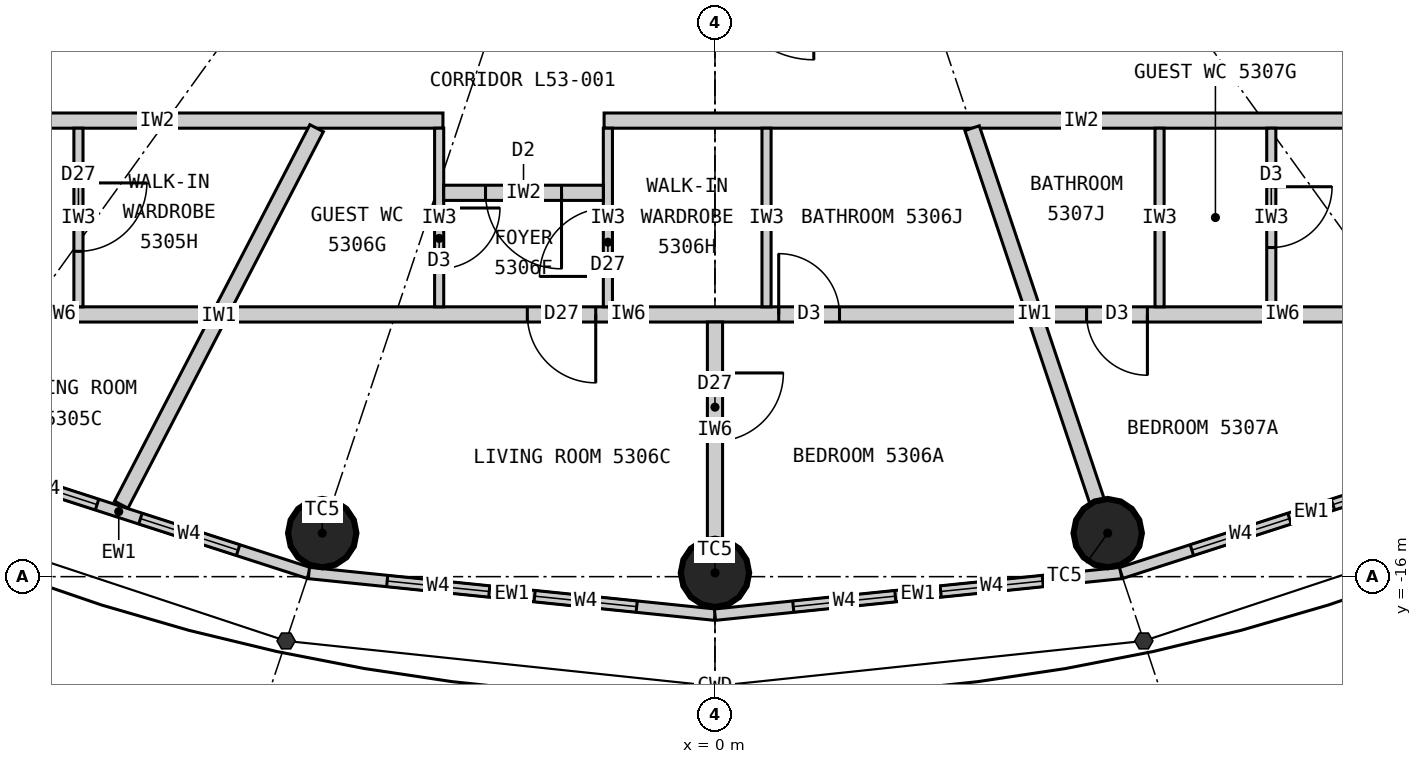
"""IFC4 building model, lengths in metres.
Left out: names, types, materials, properties, quantities, classifications, styles, units other than length and angle.
Written with IfcOpenShell. Run it as: python <this file> out.ifc"""

import sys

from ifc_helpers import new_model, si_unit, direction, frame, frame_2d, origin, origin_2d, place, context, subcontext, project, spatial, rectangle, circle, extrude, element, fill, save


model = new_model("IFC4")
c1 = context("Model", 3, precision=1e-05, world=origin(), true_north=direction((0.0, 1.0)))
c2 = subcontext(c1, "Body", "Model", "MODEL_VIEW")
j1 = project(units=[si_unit("LENGTHUNIT", "METRE"), si_unit("PLANEANGLEUNIT", "RADIAN")], contexts=[c1])
p1 = place(None, origin())
s1 = spatial("IfcSite", under=j1, at=p1, CompositionType="ELEMENT")
p2 = place(p1, origin())
s2 = spatial("IfcBuilding", under=s1, at=p2, CompositionType="ELEMENT")
p3 = place(p2, frame((0.0, 0.0, 199.5)))
s3 = spatial("IfcBuildingStorey", under=s2, at=p3, CompositionType="ELEMENT", Elevation=199.5)
for number, where, z_axis, x_axis in (
    (1, (-5.167, -15.427, 0.0), (0.0, 0.0, 1.0), (1.0, 0.0, 0.0)),
    (2, (0.0, -15.95, 0.0), (0.0, 0.0, 1.0), (1.0, 0.0, 0.0)),
    (3, (5.167, -15.427, 0.0), (0.0, 0.0, 1.0), (1.0, 0.0, 0.0)),
):
    element("IfcColumn", number, at=place(p3, frame(where, z_axis=z_axis, x_axis=x_axis)), inside=s3, PredefinedType="COLUMN", context=c2, shape_type="SweptSolid", body=[
        extrude(circle(Radius=0.45, at=origin_2d()), origin(), (0.0, 0.0, 1.0), 3.3),
    ])
p4 = place(p3, frame((-10.346, -14.336, 0.0), z_axis=(0.0, 0.0, 1.0), x_axis=(0.951644702515, -0.307200846638, 0.0)))
e4 = element("IfcWall", 4, at=p4, inside=s3, PredefinedType="ELEMENTEDWALL", context=c2, shape_type="SweptSolid", body=[
    extrude(rectangle(XDim=5.258, YDim=0.15, at=frame_2d((2.629, 0.0))), origin(), (0.0, 0.0, 1.0), 3.12),
])
p5 = place(p4, frame((0.979, 0.0, 0.9)))
e5 = element("IfcOpeningElement", 5, at=p5, cuts=e4, PredefinedType="OPENING", context=c2, shape_type="SweptSolid", body=[
    extrude(rectangle(XDim=1.35, YDim=1.9, at=frame_2d((0.675, 0.95))), frame((0.0, 0.085, 0.0), z_axis=(0.0, -1.0, 0.0), x_axis=(1.0, 0.0, 0.0)), (0.0, 0.0, 1.0), 0.17),
])
p6 = place(p4, frame((2.929, 0.0, 0.9)))
e6 = element("IfcOpeningElement", 6, at=p6, cuts=e4, PredefinedType="OPENING", context=c2, shape_type="SweptSolid", body=[
    extrude(rectangle(XDim=1.35, YDim=1.9, at=frame_2d((0.675, 0.95))), frame((0.0, 0.085, 0.0), z_axis=(0.0, -1.0, 0.0), x_axis=(1.0, 0.0, 0.0)), (0.0, 0.0, 1.0), 0.17),
])
p7 = place(p3, frame((-5.343, -15.952, 0.0), z_axis=(0.0, 0.0, 1.0), x_axis=(0.994774574972, -0.102095763818, 0.0)))
e7 = element("IfcWall", 7, at=p7, inside=s3, PredefinedType="ELEMENTEDWALL", context=c2, shape_type="SweptSolid", body=[
    extrude(rectangle(XDim=5.371, YDim=0.15, at=frame_2d((2.686, 0.0))), origin(), (0.0, 0.0, 1.0), 3.12),
])
p8 = place(p7, frame((1.035, 0.0, 0.9)))
e8 = element("IfcOpeningElement", 8, at=p8, cuts=e7, PredefinedType="OPENING", context=c2, shape_type="SweptSolid", body=[
    extrude(rectangle(XDim=1.35, YDim=1.9, at=frame_2d((0.675, 0.95))), frame((0.0, 0.085, 0.0), z_axis=(0.0, -1.0, 0.0), x_axis=(1.0, 0.0, 0.0)), (0.0, 0.0, 1.0), 0.17),
])
p9 = place(p7, frame((2.985, 0.0, 0.9)))
e9 = element("IfcOpeningElement", 9, at=p9, cuts=e7, PredefinedType="OPENING", context=c2, shape_type="SweptSolid", body=[
    extrude(rectangle(XDim=1.35, YDim=1.9, at=frame_2d((0.675, 0.95))), frame((0.0, 0.085, 0.0), z_axis=(0.0, -1.0, 0.0), x_axis=(1.0, 0.0, 0.0)), (0.0, 0.0, 1.0), 0.17),
])
p10 = place(p3, frame((0.0, -16.5, 0.0), z_axis=(0.0, 0.0, 1.0), x_axis=(0.994774574972, 0.102095763818, 0.0)))
e10 = element("IfcWall", 10, at=p10, inside=s3, PredefinedType="ELEMENTEDWALL", context=c2, shape_type="SweptSolid", body=[
    extrude(rectangle(XDim=5.371, YDim=0.15, at=frame_2d((2.686, 0.0))), origin(), (0.0, 0.0, 1.0), 3.12),
])
p11 = place(p10, frame((1.035, 0.0, 0.9)))
e11 = element("IfcOpeningElement", 11, at=p11, cuts=e10, PredefinedType="OPENING", context=c2, shape_type="SweptSolid", body=[
    extrude(rectangle(XDim=1.35, YDim=1.9, at=frame_2d((0.675, 0.95))), frame((0.0, 0.085, 0.0), z_axis=(0.0, -1.0, 0.0), x_axis=(1.0, 0.0, 0.0)), (0.0, 0.0, 1.0), 0.17),
])
p12 = place(p10, frame((2.985, 0.0, 0.9)))
e12 = element("IfcOpeningElement", 12, at=p12, cuts=e10, PredefinedType="OPENING", context=c2, shape_type="SweptSolid", body=[
    extrude(rectangle(XDim=1.35, YDim=1.9, at=frame_2d((0.675, 0.95))), frame((0.0, 0.085, 0.0), z_axis=(0.0, -1.0, 0.0), x_axis=(1.0, 0.0, 0.0)), (0.0, 0.0, 1.0), 0.17),
])
p13 = place(p3, frame((5.343, -15.952, 0.0), z_axis=(0.0, 0.0, 1.0), x_axis=(0.951644702515, 0.307200846638, 0.0)))
e13 = element("IfcWall", 13, at=p13, inside=s3, PredefinedType="ELEMENTEDWALL", context=c2, shape_type="SweptSolid", body=[
    extrude(rectangle(XDim=5.258, YDim=0.15, at=frame_2d((2.629, 0.0))), origin(), (0.0, 0.0, 1.0), 3.12),
])
p14 = place(p13, frame((0.979, 0.0, 0.9)))
e14 = element("IfcOpeningElement", 14, at=p14, cuts=e13, PredefinedType="OPENING", context=c2, shape_type="SweptSolid", body=[
    extrude(rectangle(XDim=1.35, YDim=1.9, at=frame_2d((0.675, 0.95))), frame((0.0, 0.085, 0.0), z_axis=(0.0, -1.0, 0.0), x_axis=(1.0, 0.0, 0.0)), (0.0, 0.0, 1.0), 0.17),
])
p15 = place(p13, frame((2.929, 0.0, 0.9)))
e15 = element("IfcOpeningElement", 15, at=p15, cuts=e13, PredefinedType="OPENING", context=c2, shape_type="SweptSolid", body=[
    extrude(rectangle(XDim=1.35, YDim=1.9, at=frame_2d((0.675, 0.95))), frame((0.0, 0.085, 0.0), z_axis=(0.0, -1.0, 0.0), x_axis=(1.0, 0.0, 0.0)), (0.0, 0.0, 1.0), 0.17),
])
p16 = place(p3, frame((11.1, -10.0, 0.0), z_axis=(0.0, 0.0, 1.0), x_axis=(-1.0, 0.0, 0.0)))
e16 = element("IfcWall", 16, at=p16, inside=s3, PredefinedType="PARTITIONING", context=c2, shape_type="SweptSolid", body=[
    extrude(rectangle(XDim=12.559, YDim=0.2, at=frame_2d((6.28, 0.0))), origin(), (0.0, 0.0, 1.0), 3.12),
])
p17 = place(p3, frame((-3.579, -10.0, 0.0), z_axis=(0.0, 0.0, 1.0), x_axis=(-1.0, 0.0, 0.0)))
e17 = element("IfcWall", 17, at=p17, inside=s3, PredefinedType="PARTITIONING", context=c2, shape_type="SweptSolid", body=[
    extrude(rectangle(XDim=7.521, YDim=0.2, at=frame_2d((3.761, 0.0))), origin(), (0.0, 0.0, 1.0), 3.12),
])
p18 = place(p17, frame((6.206, 0.0, 0.0)))
e18 = element("IfcOpeningElement", 18, at=p18, cuts=e17, PredefinedType="OPENING", context=c2, shape_type="SweptSolid", body=[
    extrude(rectangle(XDim=1.0, YDim=2.2, at=frame_2d((0.5, 1.1))), frame((0.0, 0.11, 0.0), z_axis=(0.0, -1.0, 0.0), x_axis=(1.0, 0.0, 0.0)), (0.0, 0.0, 1.0), 0.22),
])
p19 = place(p3, frame((-5.241, -10.1, 0.0), z_axis=(0.0, 0.0, 1.0), x_axis=(-0.460603196597, -0.887606160008, 0.0)))
e19 = element("IfcWall", 19, at=p19, inside=s3, PredefinedType="PARTITIONING", context=c2, shape_type="SweptSolid", body=[
    extrude(rectangle(XDim=5.58, YDim=0.2, at=frame_2d((2.79, 0.0))), origin(), (0.0, 0.0, 1.0), 3.12),
])
p20 = place(p3, frame((3.383, -10.1, 0.0), z_axis=(0.0, 0.0, 1.0), x_axis=(0.317602151035, -0.948224063003, 0.0)))
e20 = element("IfcWall", 20, at=p20, inside=s3, PredefinedType="PARTITIONING", context=c2, shape_type="SweptSolid", body=[
    extrude(rectangle(XDim=5.168, YDim=0.2, at=frame_2d((2.584, 0.0))), origin(), (0.0, 0.0, 1.0), 2.42),
])
p21 = place(p3, frame((-10.609, -12.55, 0.0), z_axis=(0.0, 0.0, 1.0), x_axis=(1.0, 0.0, 0.0)))
e21 = element("IfcWall", 21, at=p21, inside=s3, PredefinedType="PARTITIONING", context=c2, shape_type="SweptSolid", body=[
    extrude(rectangle(XDim=3.947, YDim=0.2, at=frame_2d((1.974, 0.0))), origin(), (0.0, 0.0, 1.0), 3.12),
])
p22 = place(p3, frame((-8.375, -10.1, 0.0), z_axis=(0.0, 0.0, 1.0), x_axis=(0.0, -1.0, 0.0)))
e22 = element("IfcWall", 22, at=p22, inside=s3, PredefinedType="PARTITIONING", context=c2, shape_type="SweptSolid", body=[
    extrude(rectangle(XDim=2.35, YDim=0.12, at=frame_2d((1.175, 0.0))), origin(), (0.0, 0.0, 1.0), 3.12),
])
p23 = place(p22, frame((0.72, 0.0, 0.0)))
e23 = element("IfcOpeningElement", 23, at=p23, cuts=e22, PredefinedType="OPENING", context=c2, shape_type="SweptSolid", body=[
    extrude(rectangle(XDim=0.9, YDim=2.1, at=frame_2d((0.45, 1.05))), frame((0.0, 0.07, 0.0), z_axis=(0.0, -1.0, 0.0), x_axis=(1.0, 0.0, 0.0)), (0.0, 0.0, 1.0), 0.14),
])
p24 = place(p3, frame((-6.364, -12.55, 0.0), z_axis=(0.0, 0.0, 1.0), x_axis=(1.0, 0.0, 0.0)))
e24 = element("IfcWall", 24, at=p24, inside=s3, PredefinedType="PARTITIONING", context=c2, shape_type="SweptSolid", body=[
    extrude(rectangle(XDim=10.446, YDim=0.2, at=frame_2d((5.223, 0.0))), origin(), (0.0, 0.0, 1.0), 3.12),
])
p25 = place(p24, frame((7.202, 0.0, 0.0)))
e25 = element("IfcOpeningElement", 25, at=p25, cuts=e24, PredefinedType="OPENING", context=c2, shape_type="SweptSolid", body=[
    extrude(rectangle(XDim=0.8, YDim=2.1, at=frame_2d((0.4, 1.05))), frame((0.0, 0.11, 0.0), z_axis=(0.0, -1.0, 0.0), x_axis=(1.0, 0.0, 0.0)), (0.0, 0.0, 1.0), 0.22),
])
p26 = place(p24, frame((3.895, 0.0, 0.0)))
e26 = element("IfcOpeningElement", 26, at=p26, cuts=e24, PredefinedType="OPENING", context=c2, shape_type="SweptSolid", body=[
    extrude(rectangle(XDim=0.9, YDim=2.1, at=frame_2d((0.45, 1.05))), frame((0.0, 0.11, 0.0), z_axis=(0.0, -1.0, 0.0), x_axis=(1.0, 0.0, 0.0)), (0.0, 0.0, 1.0), 0.22),
])
p27 = place(p3, frame((0.0, -12.65, 0.0), z_axis=(0.0, 0.0, 1.0), x_axis=(0.0, -1.0, 0.0)))
e27 = element("IfcWall", 27, at=p27, inside=s3, PredefinedType="PARTITIONING", context=c2, shape_type="SweptSolid", body=[
    extrude(rectangle(XDim=2.85, YDim=0.2, at=frame_2d((1.425, 0.0))), origin(), (0.0, 0.0, 1.0), 2.42),
])
p28 = place(p27, frame((0.67, 0.0, 0.0)))
e28 = element("IfcOpeningElement", 28, at=p28, cuts=e27, PredefinedType="OPENING", context=c2, shape_type="SweptSolid", body=[
    extrude(rectangle(XDim=0.9, YDim=2.1, at=frame_2d((0.45, 1.05))), frame((0.0, 0.11, 0.0), z_axis=(0.0, -1.0, 0.0), x_axis=(1.0, 0.0, 0.0)), (0.0, 0.0, 1.0), 0.22),
])
p29 = place(p3, frame((-3.629, -10.1, 0.0), z_axis=(0.0, 0.0, 1.0), x_axis=(0.0, -1.0, 0.0)))
e29 = element("IfcWall", 29, at=p29, inside=s3, PredefinedType="PARTITIONING", context=c2, shape_type="SweptSolid", body=[
    extrude(rectangle(XDim=2.35, YDim=0.12, at=frame_2d((1.175, 0.0))), origin(), (0.0, 0.0, 1.0), 3.12),
])
p30 = place(p29, frame((1.05, 0.0, 0.0)))
e30 = element("IfcOpeningElement", 30, at=p30, cuts=e29, PredefinedType="OPENING", context=c2, shape_type="SweptSolid", body=[
    extrude(rectangle(XDim=0.8, YDim=2.1, at=frame_2d((0.4, 1.05))), frame((0.0, 0.07, 0.0), z_axis=(0.0, -1.0, 0.0), x_axis=(1.0, 0.0, 0.0)), (0.0, 0.0, 1.0), 0.14),
])
p31 = place(p3, frame((-1.409, -10.1, 0.0), z_axis=(0.0, 0.0, 1.0), x_axis=(0.0, -1.0, 0.0)))
e31 = element("IfcWall", 31, at=p31, inside=s3, PredefinedType="PARTITIONING", context=c2, shape_type="SweptSolid", body=[
    extrude(rectangle(XDim=2.35, YDim=0.12, at=frame_2d((1.175, 0.0))), origin(), (0.0, 0.0, 1.0), 3.12),
])
p32 = place(p31, frame((1.05, 0.0, 0.0)))
e32 = element("IfcOpeningElement", 32, at=p32, cuts=e31, PredefinedType="OPENING", context=c2, shape_type="SweptSolid", body=[
    extrude(rectangle(XDim=0.9, YDim=2.1, at=frame_2d((0.45, 1.05))), frame((0.0, 0.07, 0.0), z_axis=(0.0, -1.0, 0.0), x_axis=(1.0, 0.0, 0.0)), (0.0, 0.0, 1.0), 0.14),
])
p33 = place(p3, frame((0.678, -10.1, 0.0), z_axis=(0.0, 0.0, 1.0), x_axis=(0.0, -1.0, 0.0)))
e33 = element("IfcWall", 33, at=p33, inside=s3, PredefinedType="PARTITIONING", context=c2, shape_type="SweptSolid", body=[
    extrude(rectangle(XDim=2.35, YDim=0.12, at=frame_2d((1.175, 0.0))), origin(), (0.0, 0.0, 1.0), 3.12),
])
p34 = place(p3, frame((-3.569, -10.95, 0.0), z_axis=(0.0, 0.0, 1.0), x_axis=(1.0, 0.0, 0.0)))
e34 = element("IfcWall", 34, at=p34, inside=s3, PredefinedType="PARTITIONING", context=c2, shape_type="SweptSolid", body=[
    extrude(rectangle(XDim=2.1, YDim=0.2, at=frame_2d((1.05, 0.0))), origin(), (0.0, 0.0, 1.0), 3.12),
])
p35 = place(p34, frame((0.55, 0.0, 0.0)))
e35 = element("IfcOpeningElement", 35, at=p35, cuts=e34, PredefinedType="OPENING", context=c2, shape_type="SweptSolid", body=[
    extrude(rectangle(XDim=1.0, YDim=2.2, at=frame_2d((0.5, 1.1))), frame((0.0, 0.11, 0.0), z_axis=(0.0, -1.0, 0.0), x_axis=(1.0, 0.0, 0.0)), (0.0, 0.0, 1.0), 0.22),
])
p36 = place(p3, frame((4.325, -12.55, 0.0), z_axis=(0.0, 0.0, 1.0), x_axis=(1.0, 0.0, 0.0)))
e36 = element("IfcWall", 36, at=p36, inside=s3, PredefinedType="PARTITIONING", context=c2, shape_type="SweptSolid", body=[
    extrude(rectangle(XDim=6.284, YDim=0.2, at=frame_2d((3.142, 0.0))), origin(), (0.0, 0.0, 1.0), 3.12),
])
p37 = place(p36, frame((0.564, 0.0, 0.0)))
e37 = element("IfcOpeningElement", 37, at=p37, cuts=e36, PredefinedType="OPENING", context=c2, shape_type="SweptSolid", body=[
    extrude(rectangle(XDim=0.8, YDim=2.1, at=frame_2d((0.4, 1.05))), frame((0.0, 0.11, 0.0), z_axis=(0.0, -1.0, 0.0), x_axis=(1.0, 0.0, 0.0)), (0.0, 0.0, 1.0), 0.22),
])
p38 = place(p3, frame((5.849, -10.1, 0.0), z_axis=(0.0, 0.0, 1.0), x_axis=(0.0, -1.0, 0.0)))
e38 = element("IfcWall", 38, at=p38, inside=s3, PredefinedType="PARTITIONING", context=c2, shape_type="SweptSolid", body=[
    extrude(rectangle(XDim=2.35, YDim=0.12, at=frame_2d((1.175, 0.0))), origin(), (0.0, 0.0, 1.0), 3.12),
])
p39 = place(p3, frame((7.319, -10.1, 0.0), z_axis=(0.0, 0.0, 1.0), x_axis=(0.0, -1.0, 0.0)))
e39 = element("IfcWall", 39, at=p39, inside=s3, PredefinedType="PARTITIONING", context=c2, shape_type="SweptSolid", body=[
    extrude(rectangle(XDim=2.35, YDim=0.12, at=frame_2d((1.175, 0.0))), origin(), (0.0, 0.0, 1.0), 3.12),
])
p40 = place(p39, frame((0.77, 0.0, 0.0)))
e40 = element("IfcOpeningElement", 40, at=p40, cuts=e39, PredefinedType="OPENING", context=c2, shape_type="SweptSolid", body=[
    extrude(rectangle(XDim=0.8, YDim=2.1, at=frame_2d((0.4, 1.05))), frame((0.0, 0.07, 0.0), z_axis=(0.0, -1.0, 0.0), x_axis=(1.0, 0.0, 0.0)), (0.0, 0.0, 1.0), 0.14),
])
p41 = place(p5, origin())
e41 = element("IfcWindow", 41, at=p41, inside=s3, PartitioningType="SINGLE_PANEL", PredefinedType="WINDOW", context=c2, shape_type="SweptSolid", body=[
    extrude(rectangle(XDim=1.35, YDim=1.9, at=frame_2d((0.675, 0.95))), frame((0.0, 0.03, 0.0), z_axis=(0.0, -1.0, 0.0), x_axis=(1.0, 0.0, 0.0)), (0.0, 0.0, 1.0), 0.06),
])
fill(e5, e41)
p42 = place(p6, origin())
e42 = element("IfcWindow", 42, at=p42, inside=s3, PartitioningType="SINGLE_PANEL", PredefinedType="WINDOW", context=c2, shape_type="SweptSolid", body=[
    extrude(rectangle(XDim=1.35, YDim=1.9, at=frame_2d((0.675, 0.95))), frame((0.0, 0.03, 0.0), z_axis=(0.0, -1.0, 0.0), x_axis=(1.0, 0.0, 0.0)), (0.0, 0.0, 1.0), 0.06),
])
fill(e6, e42)
p43 = place(p8, origin())
e43 = element("IfcWindow", 43, at=p43, inside=s3, PartitioningType="SINGLE_PANEL", PredefinedType="WINDOW", context=c2, shape_type="SweptSolid", body=[
    extrude(rectangle(XDim=1.35, YDim=1.9, at=frame_2d((0.675, 0.95))), frame((0.0, 0.03, 0.0), z_axis=(0.0, -1.0, 0.0), x_axis=(1.0, 0.0, 0.0)), (0.0, 0.0, 1.0), 0.06),
])
fill(e8, e43)
p44 = place(p9, origin())
e44 = element("IfcWindow", 44, at=p44, inside=s3, PartitioningType="SINGLE_PANEL", PredefinedType="WINDOW", context=c2, shape_type="SweptSolid", body=[
    extrude(rectangle(XDim=1.35, YDim=1.9, at=frame_2d((0.675, 0.95))), frame((0.0, 0.03, 0.0), z_axis=(0.0, -1.0, 0.0), x_axis=(1.0, 0.0, 0.0)), (0.0, 0.0, 1.0), 0.06),
])
fill(e9, e44)
p45 = place(p11, origin())
e45 = element("IfcWindow", 45, at=p45, inside=s3, PartitioningType="SINGLE_PANEL", PredefinedType="WINDOW", context=c2, shape_type="SweptSolid", body=[
    extrude(rectangle(XDim=1.35, YDim=1.9, at=frame_2d((0.675, 0.95))), frame((0.0, 0.03, 0.0), z_axis=(0.0, -1.0, 0.0), x_axis=(1.0, 0.0, 0.0)), (0.0, 0.0, 1.0), 0.06),
])
fill(e11, e45)
p46 = place(p12, origin())
e46 = element("IfcWindow", 46, at=p46, inside=s3, PartitioningType="SINGLE_PANEL", PredefinedType="WINDOW", context=c2, shape_type="SweptSolid", body=[
    extrude(rectangle(XDim=1.35, YDim=1.9, at=frame_2d((0.675, 0.95))), frame((0.0, 0.03, 0.0), z_axis=(0.0, -1.0, 0.0), x_axis=(1.0, 0.0, 0.0)), (0.0, 0.0, 1.0), 0.06),
])
fill(e12, e46)
p47 = place(p14, origin())
e47 = element("IfcWindow", 47, at=p47, inside=s3, PartitioningType="SINGLE_PANEL", PredefinedType="WINDOW", context=c2, shape_type="SweptSolid", body=[
    extrude(rectangle(XDim=1.35, YDim=1.9, at=frame_2d((0.675, 0.95))), frame((0.0, 0.03, 0.0), z_axis=(0.0, -1.0, 0.0), x_axis=(1.0, 0.0, 0.0)), (0.0, 0.0, 1.0), 0.06),
])
fill(e14, e47)
p48 = place(p15, origin())
e48 = element("IfcWindow", 48, at=p48, inside=s3, PartitioningType="SINGLE_PANEL", PredefinedType="WINDOW", context=c2, shape_type="SweptSolid", body=[
    extrude(rectangle(XDim=1.35, YDim=1.9, at=frame_2d((0.675, 0.95))), frame((0.0, 0.03, 0.0), z_axis=(0.0, -1.0, 0.0), x_axis=(1.0, 0.0, 0.0)), (0.0, 0.0, 1.0), 0.06),
])
fill(e15, e48)
p49 = place(p23, origin())
e49 = element("IfcDoor", 49, at=p49, inside=s3, OperationType="SINGLE_SWING_LEFT", PredefinedType="DOOR", context=c2, shape_type="SweptSolid", body=[
    extrude(rectangle(XDim=0.9, YDim=2.1, at=frame_2d((0.45, 1.05))), frame((0.0, 0.025, 0.0), z_axis=(0.0, -1.0, 0.0), x_axis=(1.0, 0.0, 0.0)), (0.0, 0.0, 1.0), 0.05),
])
fill(e23, e49)
p50 = place(p35, origin())
e50 = element("IfcDoor", 50, at=p50, inside=s3, OperationType="SINGLE_SWING_RIGHT", PredefinedType="DOOR", context=c2, shape_type="SweptSolid", body=[
    extrude(rectangle(XDim=1.0, YDim=2.2, at=frame_2d((0.5, 1.1))), frame((0.0, 0.025, 0.0), z_axis=(0.0, -1.0, 0.0), x_axis=(1.0, 0.0, 0.0)), (0.0, 0.0, 1.0), 0.05),
])
fill(e35, e50)
p51 = place(p30, origin())
e51 = element("IfcDoor", 51, at=p51, inside=s3, OperationType="SINGLE_SWING_LEFT", PredefinedType="DOOR", context=c2, shape_type="SweptSolid", body=[
    extrude(rectangle(XDim=0.8, YDim=2.1, at=frame_2d((0.4, 1.05))), frame((0.0, 0.025, 0.0), z_axis=(0.0, -1.0, 0.0), x_axis=(1.0, 0.0, 0.0)), (0.0, 0.0, 1.0), 0.05),
])
fill(e30, e51)
p52 = place(p32, origin())
e52 = element("IfcDoor", 52, at=p52, inside=s3, OperationType="SINGLE_SWING_RIGHT", PredefinedType="DOOR", context=c2, shape_type="SweptSolid", body=[
    extrude(rectangle(XDim=0.9, YDim=2.1, at=frame_2d((0.45, 1.05))), frame((0.0, 0.025, 0.0), z_axis=(0.0, -1.0, 0.0), x_axis=(1.0, 0.0, 0.0)), (0.0, 0.0, 1.0), 0.05),
])
fill(e32, e52)
p53 = place(p25, origin())
e53 = element("IfcDoor", 53, at=p53, inside=s3, OperationType="SINGLE_SWING_LEFT", PredefinedType="DOOR", context=c2, shape_type="SweptSolid", body=[
    extrude(rectangle(XDim=0.8, YDim=2.1, at=frame_2d((0.4, 1.05))), frame((0.0, 0.025, 0.0), z_axis=(0.0, -1.0, 0.0), x_axis=(1.0, 0.0, 0.0)), (0.0, 0.0, 1.0), 0.05),
])
fill(e25, e53)
p54 = place(p26, origin())
e54 = element("IfcDoor", 54, at=p54, inside=s3, OperationType="SINGLE_SWING_RIGHT", PredefinedType="DOOR", context=c2, shape_type="SweptSolid", body=[
    extrude(rectangle(XDim=0.9, YDim=2.1, at=frame_2d((0.45, 1.05))), frame((0.0, 0.025, 0.0), z_axis=(0.0, -1.0, 0.0), x_axis=(1.0, 0.0, 0.0)), (0.0, 0.0, 1.0), 0.05),
])
fill(e26, e54)
p55 = place(p28, origin())
e55 = element("IfcDoor", 55, at=p55, inside=s3, OperationType="SINGLE_SWING_LEFT", PredefinedType="DOOR", context=c2, shape_type="SweptSolid", body=[
    extrude(rectangle(XDim=0.9, YDim=2.1, at=frame_2d((0.45, 1.05))), frame((0.0, 0.025, 0.0), z_axis=(0.0, -1.0, 0.0), x_axis=(1.0, 0.0, 0.0)), (0.0, 0.0, 1.0), 0.05),
])
fill(e28, e55)
p56 = place(p37, origin())
e56 = element("IfcDoor", 56, at=p56, inside=s3, OperationType="SINGLE_SWING_RIGHT", PredefinedType="DOOR", context=c2, shape_type="SweptSolid", body=[
    extrude(rectangle(XDim=0.8, YDim=2.1, at=frame_2d((0.4, 1.05))), frame((0.0, 0.025, 0.0), z_axis=(0.0, -1.0, 0.0), x_axis=(1.0, 0.0, 0.0)), (0.0, 0.0, 1.0), 0.05),
])
fill(e37, e56)
p57 = place(p40, origin())
e57 = element("IfcDoor", 57, at=p57, inside=s3, OperationType="SINGLE_SWING_LEFT", PredefinedType="DOOR", context=c2, shape_type="SweptSolid", body=[
    extrude(rectangle(XDim=0.8, YDim=2.1, at=frame_2d((0.4, 1.05))), frame((0.0, 0.025, 0.0), z_axis=(0.0, -1.0, 0.0), x_axis=(1.0, 0.0, 0.0)), (0.0, 0.0, 1.0), 0.05),
])
fill(e40, e57)
save(model, sys.argv[1])
